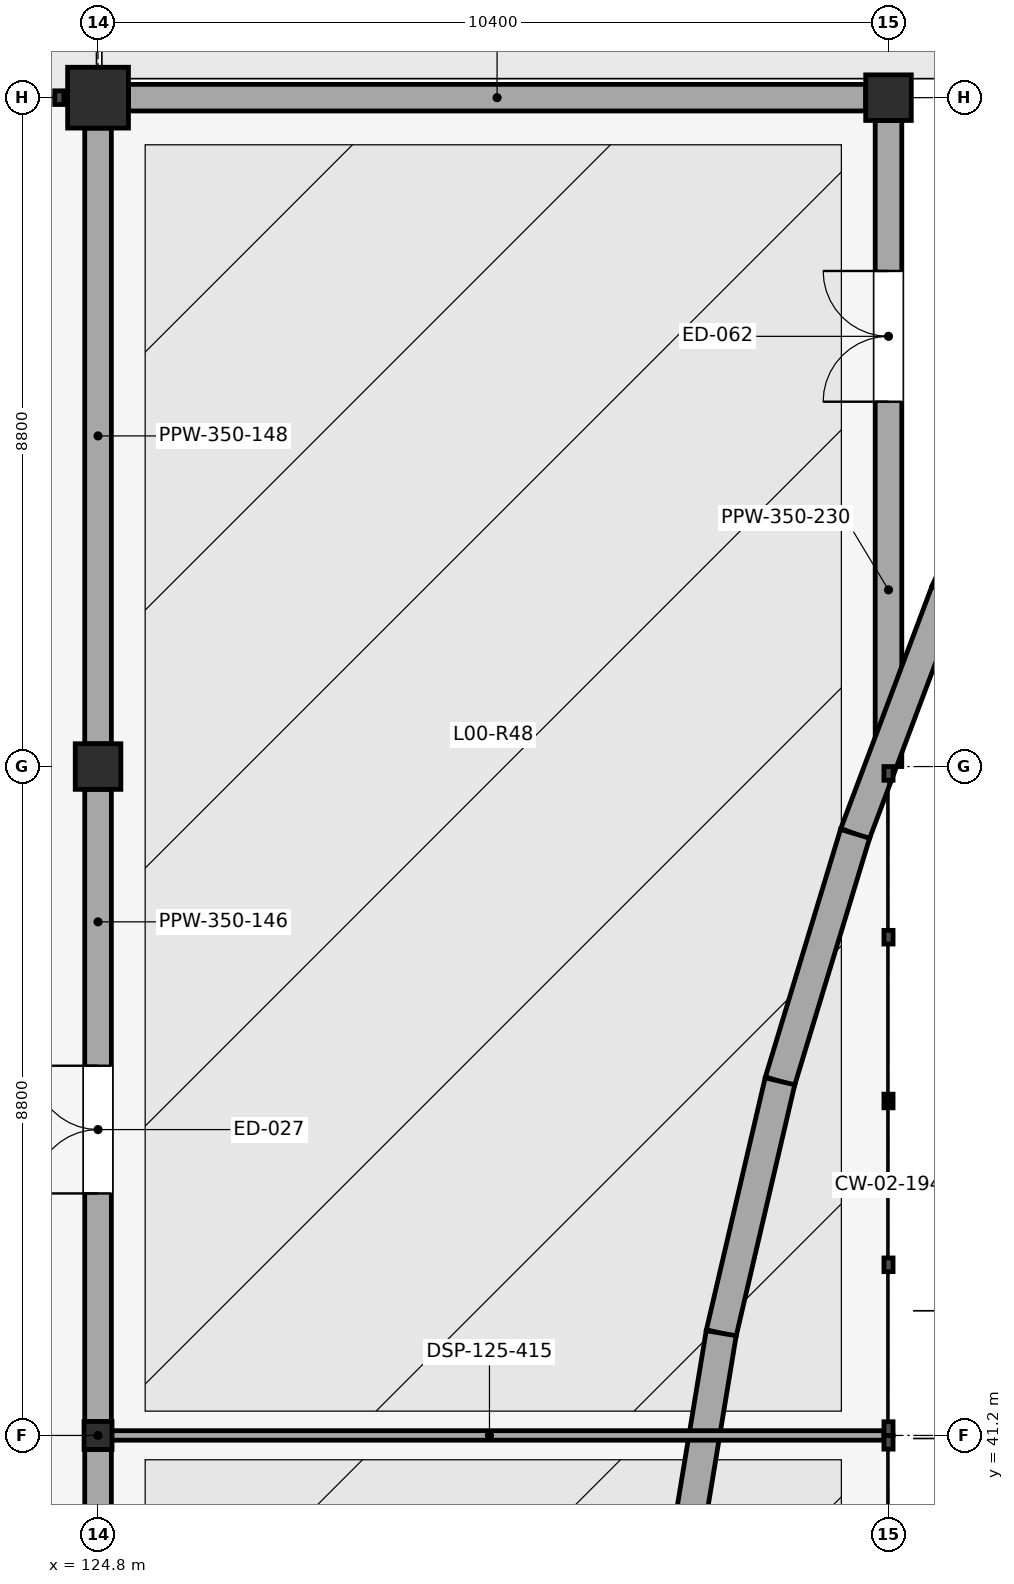
"""IFC4 building model, lengths in metres.
Left out: names, types, materials, properties, quantities, classifications, styles, units other than length and angle.
Written with IfcOpenShell. Run it as: python <this file> out.ifc"""

import sys

from ifc_helpers import new_model, si_unit, direction, frame, frame_2d, origin, origin_2d, place, context, subcontext, project, spatial, rectangle, i_section, extrude, element, fill, save


model = new_model("IFC4")
c1 = context("Model", 3, precision=1e-05, world=origin(), true_north=direction((0.0, 1.0)))
c2 = subcontext(c1, "Body", "Model", "MODEL_VIEW")
j1 = project(units=[si_unit("LENGTHUNIT", "METRE"), si_unit("PLANEANGLEUNIT", "RADIAN")], contexts=[c1])
p1 = place(None, origin())
s1 = spatial("IfcSite", under=j1, at=p1, CompositionType="ELEMENT")
p2 = place(p1, origin())
s2 = spatial("IfcBuilding", under=s1, at=p2, CompositionType="ELEMENT")
p3 = place(p2, origin())
s3 = spatial("IfcBuildingStorey", under=s2, at=p3, CompositionType="ELEMENT", Elevation=0.0)
p4 = place(p3, frame((124.8, 41.2, 0.0), z_axis=(0.0, 0.0, 1.0), x_axis=(1.0, 0.0, 0.0)))
e1 = element("IfcColumn", 1, at=p4, inside=s3, PredefinedType="COLUMN", context=c2, shape_type="SweptSolid", body=[
    extrude(i_section(OverallWidth=0.368, OverallDepth=0.368, WebThickness=0.015, FlangeThickness=0.024, FilletRadius=0.025, at=origin_2d()), origin(), (0.0, 0.0, 1.0), 4.8),
])
p5 = place(p3, frame((124.8, 50.0, 0.0), z_axis=(0.0, 0.0, 1.0), x_axis=(1.0, 0.0, 0.0)))
e2 = element("IfcColumn", 2, at=p5, inside=s3, PredefinedType="COLUMN", context=c2, shape_type="SweptSolid", body=[
    extrude(rectangle(XDim=0.6, YDim=0.6, at=origin_2d()), origin(), (0.0, 0.0, 1.0), 4.8),
])
p6 = place(p3, frame((124.8, 58.8, 0.0), z_axis=(0.0, 0.0, 1.0), x_axis=(1.0, 0.0, 0.0)))
e3 = element("IfcColumn", 3, at=p6, inside=s3, PredefinedType="COLUMN", context=c2, shape_type="SweptSolid", body=[
    extrude(rectangle(XDim=0.8, YDim=0.8, at=origin_2d()), origin(), (0.0, 0.0, 1.0), 4.8),
])
p7 = place(p3, frame((135.2, 58.8, 0.0), z_axis=(0.0, 0.0, 1.0), x_axis=(1.0, 0.0, 0.0)))
e4 = element("IfcColumn", 4, at=p7, inside=s3, PredefinedType="COLUMN", context=c2, shape_type="SweptSolid", body=[
    extrude(rectangle(XDim=0.6, YDim=0.6, at=origin_2d()), origin(), (0.0, 0.0, 1.0), 4.8),
])
p8 = place(p3, frame((124.8, 32.584, 0.0), z_axis=(0.0, 0.0, 1.0), x_axis=(0.0, 1.0, 0.0)))
e5 = element("IfcWall", 5, at=p8, inside=s3, PredefinedType="SOLIDWALL", context=c2, shape_type="SweptSolid", body=[
    extrude(rectangle(XDim=8.432, YDim=0.35, at=frame_2d((4.216, 0.0))), origin(), (0.0, 0.0, 1.0), 4.1),
])
p9 = place(p8, frame((3.0, 0.0, 0.0)))
e6 = element("IfcOpeningElement", 6, at=p9, cuts=e5, PredefinedType="OPENING", context=c2, shape_type="SweptSolid", body=[
    extrude(rectangle(XDim=1.72, YDim=2.34, at=frame_2d((0.86, 1.17))), frame((0.0, 0.185, 0.0), z_axis=(0.0, -1.0, 0.0), x_axis=(1.0, 0.0, 0.0)), (0.0, 0.0, 1.0), 0.37),
])
p10 = place(p3, frame((124.8, 41.384, 0.0), z_axis=(0.0, 0.0, 1.0), x_axis=(0.0, 1.0, 0.0)))
e7 = element("IfcWall", 7, at=p10, inside=s3, PredefinedType="SOLIDWALL", context=c2, shape_type="SweptSolid", body=[
    extrude(rectangle(XDim=8.316, YDim=0.35, at=frame_2d((4.158, 0.0))), origin(), (0.0, 0.0, 1.0), 4.1),
])
p11 = place(p10, frame((3.0, 0.0, 0.0)))
e8 = element("IfcOpeningElement", 8, at=p11, cuts=e7, PredefinedType="OPENING", context=c2, shape_type="SweptSolid", body=[
    extrude(rectangle(XDim=1.68, YDim=2.31, at=frame_2d((0.84, 1.155))), frame((0.0, 0.185, 0.0), z_axis=(0.0, -1.0, 0.0), x_axis=(1.0, 0.0, 0.0)), (0.0, 0.0, 1.0), 0.37),
])
p12 = place(p3, frame((124.8, 50.3, 0.0), z_axis=(0.0, 0.0, 1.0), x_axis=(0.0, 1.0, 0.0)))
e9 = element("IfcWall", 9, at=p12, inside=s3, PredefinedType="SOLIDWALL", context=c2, shape_type="SweptSolid", body=[
    extrude(rectangle(XDim=8.1, YDim=0.35, at=frame_2d((4.05, 0.0))), origin(), (0.0, 0.0, 1.0), 4.1),
])
p13 = place(p3, frame((135.2, 50.0, 0.0), z_axis=(0.0, 0.0, 1.0), x_axis=(0.0, 1.0, 0.0)))
e10 = element("IfcWall", 10, at=p13, inside=s3, PredefinedType="SOLIDWALL", context=c2, shape_type="SweptSolid", body=[
    extrude(rectangle(XDim=8.5, YDim=0.35, at=frame_2d((4.25, 0.0))), origin(), (0.0, 0.0, 1.0), 4.1),
])
p14 = place(p13, frame((4.8, 0.0, 0.0)))
e11 = element("IfcOpeningElement", 11, at=p14, cuts=e10, PredefinedType="OPENING", context=c2, shape_type="SweptSolid", body=[
    extrude(rectangle(XDim=1.72, YDim=2.34, at=frame_2d((0.86, 1.17))), frame((0.0, 0.185, 0.0), z_axis=(0.0, -1.0, 0.0), x_axis=(1.0, 0.0, 0.0)), (0.0, 0.0, 1.0), 0.37),
])
p15 = place(p3, frame((125.2, 58.8, 0.0), z_axis=(0.0, 0.0, 1.0), x_axis=(1.0, 0.0, 0.0)))
e12 = element("IfcWall", 12, at=p15, inside=s3, PredefinedType="SOLIDWALL", context=c2, shape_type="SweptSolid", body=[
    extrude(rectangle(XDim=9.7, YDim=0.35, at=frame_2d((4.85, 0.0))), origin(), (0.0, 0.0, 1.0), 4.1),
])
p16 = place(p3, frame((136.334, 41.881, -1.3), z_axis=(0.0, 0.0, 1.0), x_axis=(-0.162929587376, -0.986637699238, 0.0)))
e13 = element("IfcWall", 13, at=p16, inside=s3, PredefinedType="SOLIDWALL", context=c2, shape_type="SweptSolid", body=[
    extrude(rectangle(XDim=3.18, YDim=0.4, at=frame_2d((1.59, 0.0))), origin(), (0.0, 0.0, 1.0), 5.84),
])
p17 = place(p3, frame((137.363, 55.399, -1.3), z_axis=(0.0, 0.0, 1.0), x_axis=(-0.412937791366, -0.910759232982, 0.0)))
e14 = element("IfcWall", 14, at=p17, inside=s3, PredefinedType="SOLIDWALL", context=c2, shape_type="SweptSolid", body=[
    extrude(rectangle(XDim=3.403, YDim=0.4, at=frame_2d((1.701, 0.0))), origin(), (0.0, 0.0, 1.0), 5.84),
])
p18 = place(p3, frame((135.958, 52.3, -1.3), z_axis=(0.0, 0.0, 1.0), x_axis=(-0.352051035757, -0.935980805478, 0.0)))
e15 = element("IfcWall", 15, at=p18, inside=s3, PredefinedType="SOLIDWALL", context=c2, shape_type="SweptSolid", body=[
    extrude(rectangle(XDim=3.403, YDim=0.4, at=frame_2d((1.701, 0.0))), origin(), (0.0, 0.0, 1.0), 5.84),
])
p19 = place(p3, frame((134.76, 49.115, -1.3), z_axis=(0.0, 0.0, 1.0), x_axis=(-0.290367808858, -0.956915114093, 0.0)))
e16 = element("IfcWall", 16, at=p19, inside=s3, PredefinedType="SOLIDWALL", context=c2, shape_type="SweptSolid", body=[
    extrude(rectangle(XDim=3.403, YDim=0.4, at=frame_2d((1.701, 0.0))), origin(), (0.0, 0.0, 1.0), 5.84),
])
p20 = place(p3, frame((133.772, 45.859, -1.3), z_axis=(0.0, 0.0, 1.0), x_axis=(-0.227143430466, -0.973861315587, 0.0)))
e17 = element("IfcWall", 17, at=p20, inside=s3, PredefinedType="SOLIDWALL", context=c2, shape_type="SweptSolid", body=[
    extrude(rectangle(XDim=3.403, YDim=0.4, at=frame_2d((1.701, 0.0))), origin(), (0.0, 0.0, 1.0), 5.84),
])
p21 = place(p3, frame((132.999, 42.545, -1.3), z_axis=(0.0, 0.0, 1.0), x_axis=(-0.162770150472, -0.986664014807, 0.0)))
e18 = element("IfcWall", 18, at=p21, inside=s3, PredefinedType="SOLIDWALL", context=c2, shape_type="SweptSolid", body=[
    extrude(rectangle(XDim=3.403, YDim=0.4, at=frame_2d((1.702, 0.0))), origin(), (0.0, 0.0, 1.0), 5.84),
])
p22 = place(p3, frame((124.75, 41.2, 0.0), z_axis=(0.0, 0.0, 1.0), x_axis=(1.0, 0.0, 0.0)))
e19 = element("IfcWall", 19, at=p22, inside=s3, PredefinedType="PARTITIONING", context=c2, shape_type="SweptSolid", body=[
    extrude(rectangle(XDim=10.4, YDim=0.125, at=frame_2d((5.2, 0.0))), origin(), (0.0, 0.0, 1.0), 3.835),
])
p23 = place(p11, origin())
e20 = element("IfcDoor", 20, at=p23, inside=s3, OperationType="DOUBLE_DOOR_SINGLE_SWING", PredefinedType="DOOR", context=c2, shape_type="SweptSolid", body=[
    extrude(rectangle(XDim=1.68, YDim=2.31, at=frame_2d((0.84, 1.155))), frame((0.0, 0.025, 0.0), z_axis=(0.0, -1.0, 0.0), x_axis=(1.0, 0.0, 0.0)), (0.0, 0.0, 1.0), 0.05),
])
fill(e8, e20)
p24 = place(p14, origin())
e21 = element("IfcDoor", 21, at=p24, inside=s3, OperationType="DOUBLE_DOOR_SINGLE_SWING", PredefinedType="DOOR", context=c2, shape_type="SweptSolid", body=[
    extrude(rectangle(XDim=1.72, YDim=2.34, at=frame_2d((0.86, 1.17))), frame((0.0, 0.025, 0.0), z_axis=(0.0, -1.0, 0.0), x_axis=(1.0, 0.0, 0.0)), (0.0, 0.0, 1.0), 0.05),
])
fill(e11, e21)
save(model, sys.argv[1])
